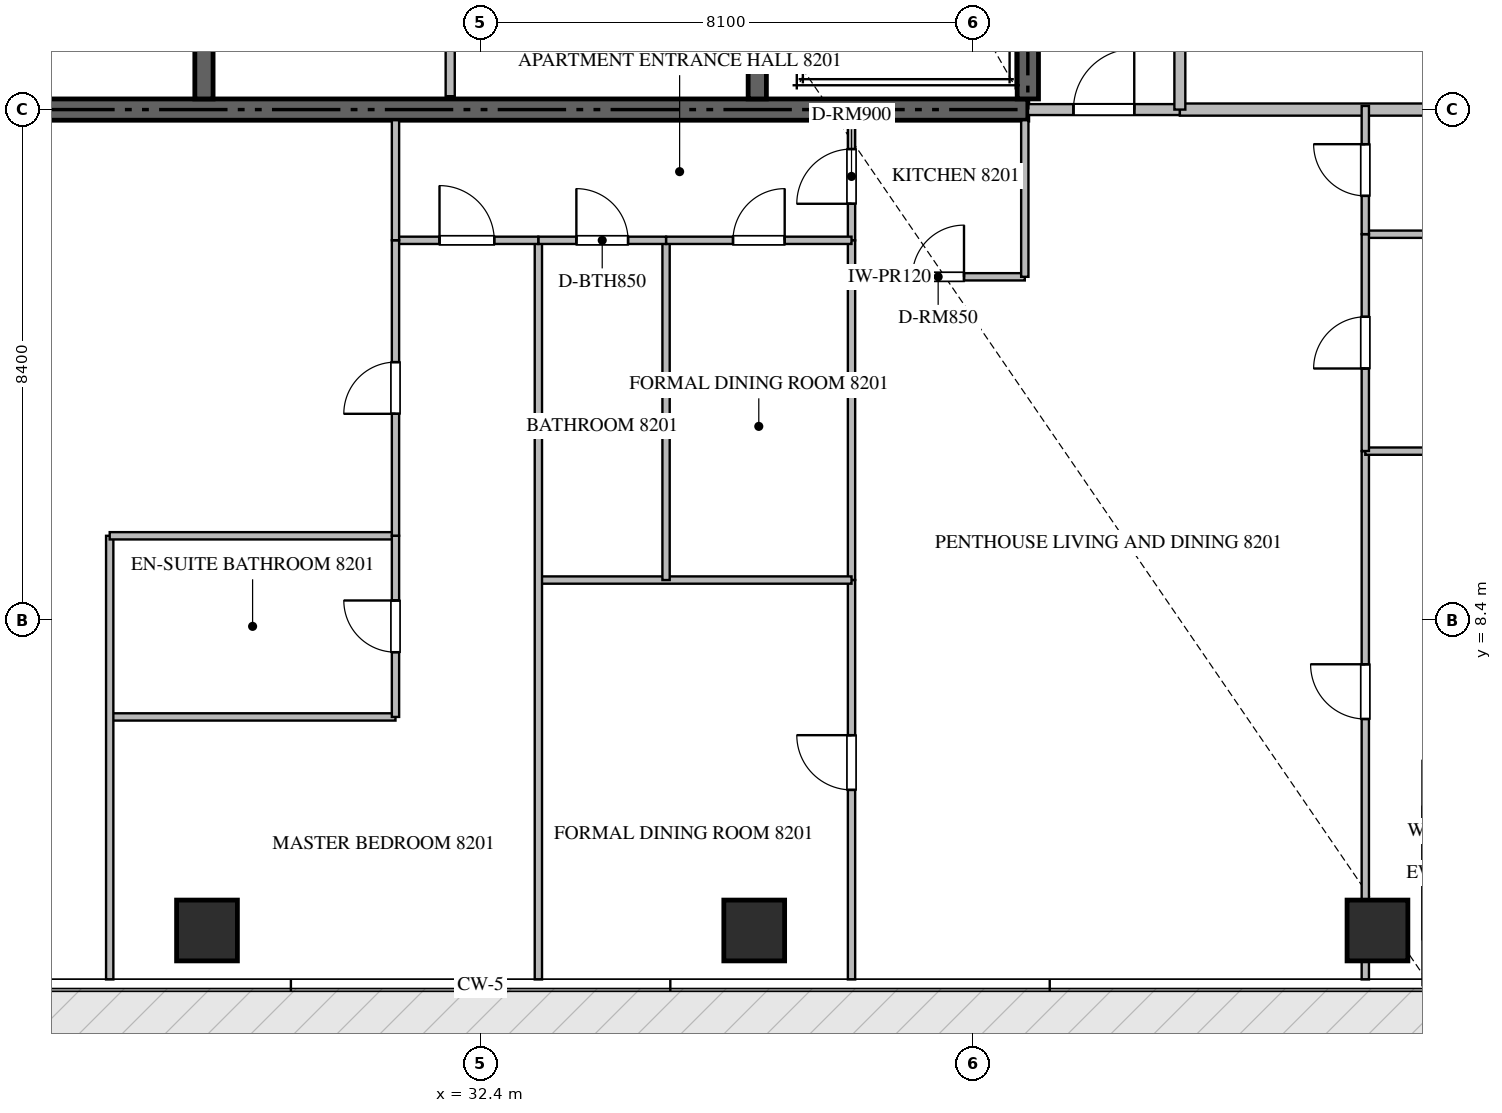
"""IFC4 building model, lengths in metres.
Left out: names, types, materials, properties, quantities, classifications, styles, units other than length and angle.
Written with IfcOpenShell. Run it as: python <this file> out.ifc"""

import sys

from ifc_helpers import new_model, si_unit, direction, frame, frame_2d, origin, origin_2d, place, context, subcontext, project, spatial, rectangle, extrude, source, transform, mapped, element, fill, save


model = new_model("IFC4")
c1 = context("Model", 3, precision=1e-05, world=origin(), true_north=direction((0.0, 1.0)))
c2 = subcontext(c1, "Body", "Model", "MODEL_VIEW")
j1 = project(units=[si_unit("LENGTHUNIT", "METRE"), si_unit("PLANEANGLEUNIT", "RADIAN")], contexts=[c1])
p1 = place(None, origin())
s1 = spatial("IfcSite", under=j1, at=p1, CompositionType="ELEMENT")
p2 = place(p1, origin())
s2 = spatial("IfcBuilding", under=s1, at=p2, CompositionType="ELEMENT")
p3 = place(p2, frame((0.0, 0.0, 329.9)))
s3 = spatial("IfcBuildingStorey", under=s2, at=p3, CompositionType="ELEMENT", Elevation=329.9)
p4 = place(p3, frame((23.4, 16.8, -0.26), z_axis=(0.0, 0.0, 1.0), x_axis=(1.0, 0.0, 0.0)))
e1 = element("IfcWall", 1, at=p4, inside=s3, PredefinedType="SHEAR", context=c2, shape_type="SweptSolid", body=[
    extrude(rectangle(XDim=18.0, YDim=0.35, at=frame_2d((9.0, 0.0))), origin(), (0.0, 0.0, 1.0), 4.048),
])
p5 = place(p3, frame((41.4, 16.975, -0.26), z_axis=(0.0, 0.0, 1.0), x_axis=(0.0, 1.0, 0.0)))
e2 = element("IfcWall", 2, at=p5, inside=s3, PredefinedType="SHEAR", context=c2, shape_type="SweptSolid", body=[
    extrude(rectangle(XDim=8.375, YDim=0.35, at=frame_2d((4.188, 0.0))), origin(), (0.0, 0.0, 1.0), 4.048),
])
p6 = place(p3, frame((27.85, 16.975, -0.26), z_axis=(0.0, 0.0, 1.0), x_axis=(0.0, 1.0, 0.0)))
e3 = element("IfcWall", 3, at=p6, inside=s3, PredefinedType="SHEAR", context=c2, shape_type="SweptSolid", body=[
    extrude(rectangle(XDim=4.875, YDim=0.3, at=frame_2d((2.438, 0.0))), origin(), (0.0, 0.0, 1.0), 4.048),
])
p7 = place(p3, frame((36.95, 16.975, -0.26), z_axis=(0.0, 0.0, 1.0), x_axis=(0.0, 1.0, 0.0)))
e4 = element("IfcWall", 4, at=p7, inside=s3, PredefinedType="SHEAR", context=c2, shape_type="SweptSolid", body=[
    extrude(rectangle(XDim=8.375, YDim=0.3, at=frame_2d((4.188, 0.0))), origin(), (0.0, 0.0, 1.0), 4.048),
])
m1 = source(origin(), c2, "Body", "SweptSolid", [
    extrude(rectangle(XDim=1.0, YDim=1.0, at=origin_2d()), origin(), (0.0, 0.0, 1.0), 4.05),
])
for number, where, z_axis, x_axis in (
    (5, (27.9, 3.3, -0.26), (0.0, 0.0, 1.0), (1.0, 0.0, 0.0)),
    (6, (36.9, 3.3, -0.26), (0.0, 0.0, 1.0), (1.0, 0.0, 0.0)),
    (7, (47.15, 3.3, -0.26), (0.0, 0.0, 1.0), (1.0, 0.0, 0.0)),
):
    element("IfcColumn", number, at=place(p3, frame(where, z_axis=z_axis, x_axis=x_axis)), inside=s3, PredefinedType="COLUMN", context=c2, shape_type="MappedRepresentation", body=[
        mapped(m1, transform((0.0, 0.0, 0.0), scale=1.0)),
    ])
p8 = place(p3, frame((48.0, 2.4, 0.0), z_axis=(0.0, 0.0, 1.0), x_axis=(0.0, 1.0, 0.0)))
e8 = element("IfcWall", 8, at=p8, inside=s3, PredefinedType="ELEMENTEDWALL", context=c2, shape_type="SweptSolid", body=[
    extrude(rectangle(XDim=3.69, YDim=0.22, at=frame_2d((1.845, 0.0))), origin(), (0.0, 0.0, 1.0), 3.775),
])
p9 = place(p8, frame((0.745, 0.0, 0.65)))
e9 = element("IfcOpeningElement", 9, at=p9, cuts=e8, PredefinedType="OPENING", context=c2, shape_type="SweptSolid", body=[
    extrude(rectangle(XDim=2.2, YDim=2.4, at=frame_2d((1.1, 1.2))), frame((0.0, 0.12, 0.0), z_axis=(0.0, -1.0, 0.0), x_axis=(1.0, 0.0, 0.0)), (0.0, 0.0, 1.0), 0.24),
])
p10 = place(p3, frame((31.9, 17.02, 0.0), z_axis=(0.0, 0.0, 1.0), x_axis=(0.0, 1.0, 0.0)))
e10 = element("IfcWall", 10, at=p10, inside=s3, PredefinedType="PARTITIONING", context=c2, shape_type="SweptSolid", body=[
    extrude(rectangle(XDim=2.73, YDim=0.15, at=frame_2d((1.365, 0.0))), origin(), (0.0, 0.0, 1.0), 3.79),
])
p11 = place(p3, frame((43.9, 16.8, 0.0), z_axis=(0.0, 0.0, 1.0), x_axis=(1.0, 0.0, 0.0)))
e11 = element("IfcWall", 11, at=p11, inside=s3, PredefinedType="PARTITIONING", context=c2, shape_type="SweptSolid", body=[
    extrude(rectangle(XDim=11.618, YDim=0.2, at=frame_2d((5.809, 0.0))), origin(), (0.0, 0.0, 1.0), 3.79),
])
p12 = place(p3, frame((41.402, 16.8, 0.0), z_axis=(0.0, 0.0, 1.0), x_axis=(1.0, 0.0, 0.0)))
e12 = element("IfcWall", 12, at=p12, inside=s3, PredefinedType="PARTITIONING", context=c2, shape_type="SweptSolid", body=[
    extrude(rectangle(XDim=2.496, YDim=0.18, at=frame_2d((1.248, 0.0))), origin(), (0.0, 0.0, 1.0), 3.79),
])
p13 = place(p12, frame((0.748, 0.0, 0.0)))
e13 = element("IfcOpeningElement", 13, at=p13, cuts=e12, PredefinedType="OPENING", context=c2, shape_type="SweptSolid", body=[
    extrude(rectangle(XDim=1.0, YDim=2.15, at=frame_2d((0.5, 1.075))), frame((0.0, 0.1, 0.0), z_axis=(0.0, -1.0, 0.0), x_axis=(1.0, 0.0, 0.0)), (0.0, 0.0, 1.0), 0.2),
])
p14 = place(p3, frame((43.9, 16.8, 0.0), z_axis=(0.0, 0.0, 1.0), x_axis=(0.0, 1.0, 0.0)))
e14 = element("IfcWall", 14, at=p14, inside=s3, PredefinedType="PARTITIONING", context=c2, shape_type="SweptSolid", body=[
    extrude(rectangle(XDim=16.8, YDim=0.18, at=frame_2d((8.4, 0.0))), origin(), (0.0, 0.0, 1.0), 3.79),
])
p15 = place(p14, frame((2.575, 0.0, 0.0)))
e15 = element("IfcOpeningElement", 15, at=p15, cuts=e14, PredefinedType="OPENING", context=c2, shape_type="SweptSolid", body=[
    extrude(rectangle(XDim=1.0, YDim=2.15, at=frame_2d((0.5, 1.075))), frame((0.0, 0.1, 0.0), z_axis=(0.0, -1.0, 0.0), x_axis=(1.0, 0.0, 0.0)), (0.0, 0.0, 1.0), 0.2),
])
p16 = place(p14, frame((10.997, 0.0, 0.0)))
e16 = element("IfcOpeningElement", 16, at=p16, cuts=e14, PredefinedType="OPENING", context=c2, shape_type="SweptSolid", body=[
    extrude(rectangle(XDim=1.0, YDim=2.15, at=frame_2d((0.5, 1.075))), frame((0.0, 0.1, 0.0), z_axis=(0.0, -1.0, 0.0), x_axis=(1.0, 0.0, 0.0)), (0.0, 0.0, 1.0), 0.2),
])
p17 = place(p3, frame((38.5, 14.05, 0.0), z_axis=(0.0, 0.0, 1.0), x_axis=(1.0, 0.0, 0.0)))
e17 = element("IfcWall", 17, at=p17, inside=s3, PredefinedType="PARTITIONING", context=c2, shape_type="SweptSolid", body=[
    extrude(rectangle(XDim=2.85, YDim=0.12, at=frame_2d((1.425, 0.0))), origin(), (0.0, 0.0, 1.0), 3.472),
])
p18 = place(p17, frame((1.0, 0.0, 0.0)))
e18 = element("IfcOpeningElement", 18, at=p18, cuts=e17, PredefinedType="OPENING", context=c2, shape_type="SweptSolid", body=[
    extrude(rectangle(XDim=0.85, YDim=2.1, at=frame_2d((0.425, 1.05))), frame((0.0, 0.07, 0.0), z_axis=(0.0, -1.0, 0.0), x_axis=(1.0, 0.0, 0.0)), (0.0, 0.0, 1.0), 0.14),
])
p19 = place(p3, frame((41.35, 14.05, 0.0), z_axis=(0.0, 0.0, 1.0), x_axis=(0.0, 1.0, 0.0)))
e19 = element("IfcWall", 19, at=p19, inside=s3, PredefinedType="PARTITIONING", context=c2, shape_type="SweptSolid", body=[
    extrude(rectangle(XDim=2.575, YDim=0.12, at=frame_2d((1.288, 0.0))), origin(), (0.0, 0.0, 1.0), 3.79),
])
p20 = place(p3, frame((38.5, 14.65, 0.0), z_axis=(0.0, 0.0, 1.0), x_axis=(0.0, 1.0, 0.0)))
e20 = element("IfcWall", 20, at=p20, inside=s3, PredefinedType="PARTITIONING", context=c2, shape_type="SweptSolid", body=[
    extrude(rectangle(XDim=1.975, YDim=0.12, at=frame_2d((0.988, 0.0))), origin(), (0.0, 0.0, 1.0), 3.79),
])
p21 = place(p20, frame((0.601, 0.0, 0.0)))
e21 = element("IfcOpeningElement", 21, at=p21, cuts=e20, PredefinedType="OPENING", context=c2, shape_type="SweptSolid", body=[
    extrude(rectangle(XDim=0.9, YDim=2.1, at=frame_2d((0.45, 1.05))), frame((0.0, 0.07, 0.0), z_axis=(0.0, -1.0, 0.0), x_axis=(1.0, 0.0, 0.0)), (0.0, 0.0, 1.0), 0.14),
])
p22 = place(p3, frame((38.5, 2.495, 0.0), z_axis=(0.0, 0.0, 1.0), x_axis=(0.0, 1.0, 0.0)))
e22 = element("IfcWall", 22, at=p22, inside=s3, PredefinedType="PARTITIONING", context=c2, shape_type="SweptSolid", body=[
    extrude(rectangle(XDim=6.568, YDim=0.12, at=frame_2d((3.284, 0.0))), origin(), (0.0, 0.0, 1.0), 3.79),
])
p23 = place(p22, frame((3.117, 0.0, 0.0)))
e23 = element("IfcOpeningElement", 23, at=p23, cuts=e22, PredefinedType="OPENING", context=c2, shape_type="SweptSolid", body=[
    extrude(rectangle(XDim=0.9, YDim=2.1, at=frame_2d((0.45, 1.05))), frame((0.0, 0.07, 0.0), z_axis=(0.0, -1.0, 0.0), x_axis=(1.0, 0.0, 0.0)), (0.0, 0.0, 1.0), 0.14),
])
p24 = place(p3, frame((38.5, 9.065, 0.0), z_axis=(0.0, 0.0, 1.0), x_axis=(0.0, 1.0, 0.0)))
e24 = element("IfcWall", 24, at=p24, inside=s3, PredefinedType="PARTITIONING", context=c2, shape_type="SweptSolid", body=[
    extrude(rectangle(XDim=5.583, YDim=0.12, at=frame_2d((2.792, 0.0))), origin(), (0.0, 0.0, 1.0), 3.79),
])
p25 = place(p3, frame((33.35, 9.063, 0.0), z_axis=(0.0, 0.0, 1.0), x_axis=(1.0, 0.0, 0.0)))
e25 = element("IfcWall", 25, at=p25, inside=s3, PredefinedType="PARTITIONING", context=c2, shape_type="SweptSolid", body=[
    extrude(rectangle(XDim=5.15, YDim=0.12, at=frame_2d((2.575, 0.0))), origin(), (0.0, 0.0, 1.0), 3.79),
])
p26 = place(p3, frame((33.35, 2.495, 0.0), z_axis=(0.0, 0.0, 1.0), x_axis=(0.0, 1.0, 0.0)))
e26 = element("IfcWall", 26, at=p26, inside=s3, PredefinedType="PARTITIONING", context=c2, shape_type="SweptSolid", body=[
    extrude(rectangle(XDim=12.155, YDim=0.12, at=frame_2d((6.077, 0.0))), origin(), (0.0, 0.0, 1.0), 3.79),
])
p27 = place(p3, frame((35.45, 9.063, 0.0), z_axis=(0.0, 0.0, 1.0), x_axis=(0.0, 1.0, 0.0)))
e27 = element("IfcWall", 27, at=p27, inside=s3, PredefinedType="PARTITIONING", context=c2, shape_type="SweptSolid", body=[
    extrude(rectangle(XDim=5.587, YDim=0.12, at=frame_2d((2.793, 0.0))), origin(), (0.0, 0.0, 1.0), 3.79),
])
p28 = place(p3, frame((33.35, 14.65, 0.0), z_axis=(0.0, 0.0, 1.0), x_axis=(1.0, 0.0, 0.0)))
e28 = element("IfcWall", 28, at=p28, inside=s3, PredefinedType="PARTITIONING", context=c2, shape_type="SweptSolid", body=[
    extrude(rectangle(XDim=2.1, YDim=0.12, at=frame_2d((1.05, 0.0))), origin(), (0.0, 0.0, 1.0), 3.79),
])
p29 = place(p28, frame((0.625, 0.0, 0.0)))
e29 = element("IfcOpeningElement", 29, at=p29, cuts=e28, PredefinedType="OPENING", context=c2, shape_type="SweptSolid", body=[
    extrude(rectangle(XDim=0.85, YDim=2.1, at=frame_2d((0.425, 1.05))), frame((0.0, 0.07, 0.0), z_axis=(0.0, -1.0, 0.0), x_axis=(1.0, 0.0, 0.0)), (0.0, 0.0, 1.0), 0.14),
])
p30 = place(p3, frame((35.452, 14.65, 0.0), z_axis=(0.0, 0.0, 1.0), x_axis=(1.0, 0.0, 0.0)))
e30 = element("IfcWall", 30, at=p30, inside=s3, PredefinedType="PARTITIONING", context=c2, shape_type="SweptSolid", body=[
    extrude(rectangle(XDim=3.048, YDim=0.12, at=frame_2d((1.524, 0.0))), origin(), (0.0, 0.0, 1.0), 3.79),
])
p31 = place(p30, frame((1.099, 0.0, 0.0)))
e31 = element("IfcOpeningElement", 31, at=p31, cuts=e30, PredefinedType="OPENING", context=c2, shape_type="SweptSolid", body=[
    extrude(rectangle(XDim=0.85, YDim=2.1, at=frame_2d((0.425, 1.05))), frame((0.0, 0.07, 0.0), z_axis=(0.0, -1.0, 0.0), x_axis=(1.0, 0.0, 0.0)), (0.0, 0.0, 1.0), 0.14),
])
p32 = place(p3, frame((31.0, 14.65, 0.0), z_axis=(0.0, 0.0, 1.0), x_axis=(1.0, 0.0, 0.0)))
e32 = element("IfcWall", 32, at=p32, inside=s3, PredefinedType="PARTITIONING", context=c2, shape_type="SweptSolid", body=[
    extrude(rectangle(XDim=2.348, YDim=0.12, at=frame_2d((1.174, 0.0))), origin(), (0.0, 0.0, 1.0), 3.79),
])
p33 = place(p32, frame((0.724, 0.0, 0.0)))
e33 = element("IfcOpeningElement", 33, at=p33, cuts=e32, PredefinedType="OPENING", context=c2, shape_type="SweptSolid", body=[
    extrude(rectangle(XDim=0.9, YDim=2.1, at=frame_2d((0.45, 1.05))), frame((0.0, 0.07, 0.0), z_axis=(0.0, -1.0, 0.0), x_axis=(1.0, 0.0, 0.0)), (0.0, 0.0, 1.0), 0.14),
])
p34 = place(p3, frame((26.3, 6.812, 0.0), z_axis=(0.0, 0.0, 1.0), x_axis=(1.0, 0.0, 0.0)))
e34 = element("IfcWall", 34, at=p34, inside=s3, PredefinedType="PARTITIONING", context=c2, shape_type="SweptSolid", body=[
    extrude(rectangle(XDim=4.7, YDim=0.12, at=frame_2d((2.35, 0.0))), origin(), (0.0, 0.0, 1.0), 3.79),
])
p35 = place(p3, frame((26.3, 2.495, 0.0), z_axis=(0.0, 0.0, 1.0), x_axis=(0.0, 1.0, 0.0)))
e35 = element("IfcWall", 35, at=p35, inside=s3, PredefinedType="PARTITIONING", context=c2, shape_type="SweptSolid", body=[
    extrude(rectangle(XDim=7.296, YDim=0.12, at=frame_2d((3.648, 0.0))), origin(), (0.0, 0.0, 1.0), 3.79),
])
p36 = place(p3, frame((26.3, 9.791, 0.0), z_axis=(0.0, 0.0, 1.0), x_axis=(1.0, 0.0, 0.0)))
e36 = element("IfcWall", 36, at=p36, inside=s3, PredefinedType="PARTITIONING", context=c2, shape_type="SweptSolid", body=[
    extrude(rectangle(XDim=4.7, YDim=0.12, at=frame_2d((2.35, 0.0))), origin(), (0.0, 0.0, 1.0), 3.79),
])
p37 = place(p3, frame((31.0, 6.812, 0.0), z_axis=(0.0, 0.0, 1.0), x_axis=(0.0, 1.0, 0.0)))
e37 = element("IfcWall", 37, at=p37, inside=s3, PredefinedType="PARTITIONING", context=c2, shape_type="SweptSolid", body=[
    extrude(rectangle(XDim=2.979, YDim=0.12, at=frame_2d((1.49, 0.0))), origin(), (0.0, 0.0, 1.0), 3.79),
])
p38 = place(p37, frame((1.065, 0.0, 0.0)))
e38 = element("IfcOpeningElement", 38, at=p38, cuts=e37, PredefinedType="OPENING", context=c2, shape_type="SweptSolid", body=[
    extrude(rectangle(XDim=0.85, YDim=2.1, at=frame_2d((0.425, 1.05))), frame((0.0, 0.07, 0.0), z_axis=(0.0, -1.0, 0.0), x_axis=(1.0, 0.0, 0.0)), (0.0, 0.0, 1.0), 0.14),
])
p39 = place(p3, frame((31.0, 9.793, 0.0), z_axis=(0.0, 0.0, 1.0), x_axis=(0.0, 1.0, 0.0)))
e39 = element("IfcWall", 39, at=p39, inside=s3, PredefinedType="PARTITIONING", context=c2, shape_type="SweptSolid", body=[
    extrude(rectangle(XDim=4.857, YDim=0.12, at=frame_2d((2.428, 0.0))), origin(), (0.0, 0.0, 1.0), 3.79),
])
p40 = place(p39, frame((2.004, 0.0, 0.0)))
e40 = element("IfcOpeningElement", 40, at=p40, cuts=e39, PredefinedType="OPENING", context=c2, shape_type="SweptSolid", body=[
    extrude(rectangle(XDim=0.85, YDim=2.1, at=frame_2d((0.425, 1.05))), frame((0.0, 0.07, 0.0), z_axis=(0.0, -1.0, 0.0), x_axis=(1.0, 0.0, 0.0)), (0.0, 0.0, 1.0), 0.14),
])
p41 = place(p3, frame((31.0, 14.652, 0.0), z_axis=(0.0, 0.0, 1.0), x_axis=(0.0, 1.0, 0.0)))
e41 = element("IfcWall", 41, at=p41, inside=s3, PredefinedType="PARTITIONING", context=c2, shape_type="SweptSolid", body=[
    extrude(rectangle(XDim=1.973, YDim=0.12, at=frame_2d((0.986, 0.0))), origin(), (0.0, 0.0, 1.0), 3.79),
])
p42 = place(p3, frame((46.95, 2.495, 0.0), z_axis=(0.0, 0.0, 1.0), x_axis=(0.0, 1.0, 0.0)))
e42 = element("IfcWall", 42, at=p42, inside=s3, PredefinedType="PARTITIONING", context=c2, shape_type="SweptSolid", body=[
    extrude(rectangle(XDim=8.688, YDim=0.12, at=frame_2d((4.344, 0.0))), origin(), (0.0, 0.0, 1.0), 3.292),
])
p43 = place(p42, frame((4.283, 0.0, 0.0)))
e43 = element("IfcOpeningElement", 43, at=p43, cuts=e42, PredefinedType="OPENING", context=c2, shape_type="SweptSolid", body=[
    extrude(rectangle(XDim=0.9, YDim=2.1, at=frame_2d((0.45, 1.05))), frame((0.0, 0.07, 0.0), z_axis=(0.0, -1.0, 0.0), x_axis=(1.0, 0.0, 0.0)), (0.0, 0.0, 1.0), 0.14),
])
for number, where, z_axis, x_axis in (
    (44, (46.95, 11.183, 0.0), (0.0, 0.0, 1.0), (1.0, 0.0, 0.0)),
    (45, (46.95, 14.75, 0.0), (0.0, 0.0, 1.0), (1.0, 0.0, 0.0)),
):
    element("IfcWall", number, at=place(p3, frame(where, z_axis=z_axis, x_axis=x_axis)), inside=s3, PredefinedType="PARTITIONING", context=c2, shape_type="SweptSolid", body=[
        extrude(rectangle(XDim=8.555, YDim=0.12, at=frame_2d((4.277, 0.0))), origin(), (0.0, 0.0, 1.0), 3.79),
    ])
p44 = place(p3, frame((46.95, 11.185, 0.0), z_axis=(0.0, 0.0, 1.0), x_axis=(0.0, 1.0, 0.0)))
e46 = element("IfcWall", 46, at=p44, inside=s3, PredefinedType="PARTITIONING", context=c2, shape_type="SweptSolid", body=[
    extrude(rectangle(XDim=3.565, YDim=0.12, at=frame_2d((1.782, 0.0))), origin(), (0.0, 0.0, 1.0), 3.372),
])
p45 = place(p44, frame((1.357, 0.0, 0.0)))
e47 = element("IfcOpeningElement", 47, at=p45, cuts=e46, PredefinedType="OPENING", context=c2, shape_type="SweptSolid", body=[
    extrude(rectangle(XDim=0.85, YDim=2.1, at=frame_2d((0.425, 1.05))), frame((0.0, 0.07, 0.0), z_axis=(0.0, -1.0, 0.0), x_axis=(1.0, 0.0, 0.0)), (0.0, 0.0, 1.0), 0.14),
])
p46 = place(p3, frame((46.95, 14.752, 0.0), z_axis=(0.0, 0.0, 1.0), x_axis=(0.0, 1.0, 0.0)))
e48 = element("IfcWall", 48, at=p46, inside=s3, PredefinedType="PARTITIONING", context=c2, shape_type="SweptSolid", body=[
    extrude(rectangle(XDim=2.108, YDim=0.12, at=frame_2d((1.054, 0.0))), origin(), (0.0, 0.0, 1.0), 3.372),
])
p47 = place(p46, frame((0.629, 0.0, 0.0)))
e49 = element("IfcOpeningElement", 49, at=p47, cuts=e48, PredefinedType="OPENING", context=c2, shape_type="SweptSolid", body=[
    extrude(rectangle(XDim=0.85, YDim=2.1, at=frame_2d((0.425, 1.05))), frame((0.0, 0.07, 0.0), z_axis=(0.0, -1.0, 0.0), x_axis=(1.0, 0.0, 0.0)), (0.0, 0.0, 1.0), 0.14),
])
m2 = source(origin(), c2, "Body", "SweptSolid", [
    extrude(rectangle(XDim=1.0, YDim=2.15, at=frame_2d((0.5, 1.075))), frame((0.0, 0.025, 0.0), z_axis=(0.0, -1.0, 0.0), x_axis=(1.0, 0.0, 0.0)), (0.0, 0.0, 1.0), 0.05),
])
p48 = place(p13, origin())
e50 = element("IfcDoor", 50, at=p48, inside=s3, OperationType="SINGLE_SWING_RIGHT", PredefinedType="DOOR", context=c2, shape_type="MappedRepresentation", body=[
    mapped(m2, transform((0.0, 0.0, 0.0), scale=1.0)),
])
fill(e13, e50)
m3 = source(origin(), c2, "Body", "SweptSolid", [
    extrude(rectangle(XDim=0.85, YDim=2.1, at=frame_2d((0.425, 1.05))), frame((0.0, 0.025, 0.0), z_axis=(0.0, -1.0, 0.0), x_axis=(1.0, 0.0, 0.0)), (0.0, 0.0, 1.0), 0.05),
])
p49 = place(p18, origin())
e51 = element("IfcDoor", 51, at=p49, inside=s3, OperationType="SINGLE_SWING_RIGHT", PredefinedType="DOOR", context=c2, shape_type="MappedRepresentation", body=[
    mapped(m3, transform((0.0, 0.0, 0.0), scale=1.0)),
])
fill(e18, e51)
m4 = source(origin(), c2, "Body", "SweptSolid", [
    extrude(rectangle(XDim=0.9, YDim=2.1, at=frame_2d((0.45, 1.05))), frame((0.0, 0.025, 0.0), z_axis=(0.0, -1.0, 0.0), x_axis=(1.0, 0.0, 0.0)), (0.0, 0.0, 1.0), 0.05),
])
p50 = place(p21, origin())
e52 = element("IfcDoor", 52, at=p50, inside=s3, OperationType="SINGLE_SWING_LEFT", PredefinedType="DOOR", context=c2, shape_type="MappedRepresentation", body=[
    mapped(m4, transform((0.0, 0.0, 0.0), scale=1.0)),
])
fill(e21, e52)
p51 = place(p23, origin())
e53 = element("IfcDoor", 53, at=p51, inside=s3, OperationType="SINGLE_SWING_RIGHT", PredefinedType="DOOR", context=c2, shape_type="MappedRepresentation", body=[
    mapped(m4, transform((0.0, 0.0, 0.0), scale=1.0)),
])
fill(e23, e53)
p52 = place(p29, origin())
e54 = element("IfcDoor", 54, at=p52, inside=s3, OperationType="SINGLE_SWING_LEFT", PredefinedType="DOOR", context=c2, shape_type="MappedRepresentation", body=[
    mapped(m3, transform((0.0, 0.0, 0.0), scale=1.0)),
])
fill(e29, e54)
p53 = place(p31, origin())
e55 = element("IfcDoor", 55, at=p53, inside=s3, OperationType="SINGLE_SWING_RIGHT", PredefinedType="DOOR", context=c2, shape_type="MappedRepresentation", body=[
    mapped(m3, transform((0.0, 0.0, 0.0), scale=1.0)),
])
fill(e31, e55)
p54 = place(p33, origin())
e56 = element("IfcDoor", 56, at=p54, inside=s3, OperationType="SINGLE_SWING_LEFT", PredefinedType="DOOR", context=c2, shape_type="MappedRepresentation", body=[
    mapped(m4, transform((0.0, 0.0, 0.0), scale=1.0)),
])
fill(e33, e56)
p55 = place(p38, origin())
e57 = element("IfcDoor", 57, at=p55, inside=s3, OperationType="SINGLE_SWING_RIGHT", PredefinedType="DOOR", context=c2, shape_type="MappedRepresentation", body=[
    mapped(m3, transform((0.0, 0.0, 0.0), scale=1.0)),
])
fill(e38, e57)
p56 = place(p40, origin())
e58 = element("IfcDoor", 58, at=p56, inside=s3, OperationType="SINGLE_SWING_LEFT", PredefinedType="DOOR", context=c2, shape_type="MappedRepresentation", body=[
    mapped(m3, transform((0.0, 0.0, 0.0), scale=1.0)),
])
fill(e40, e58)
p57 = place(p43, origin())
e59 = element("IfcDoor", 59, at=p57, inside=s3, OperationType="SINGLE_SWING_RIGHT", PredefinedType="DOOR", context=c2, shape_type="MappedRepresentation", body=[
    mapped(m4, transform((0.0, 0.0, 0.0), scale=1.0)),
])
fill(e43, e59)
p58 = place(p45, origin())
e60 = element("IfcDoor", 60, at=p58, inside=s3, OperationType="SINGLE_SWING_LEFT", PredefinedType="DOOR", context=c2, shape_type="MappedRepresentation", body=[
    mapped(m3, transform((0.0, 0.0, 0.0), scale=1.0)),
])
fill(e47, e60)
p59 = place(p47, origin())
e61 = element("IfcDoor", 61, at=p59, inside=s3, OperationType="SINGLE_SWING_RIGHT", PredefinedType="DOOR", context=c2, shape_type="MappedRepresentation", body=[
    mapped(m3, transform((0.0, 0.0, 0.0), scale=1.0)),
])
fill(e49, e61)
save(model, sys.argv[1])
